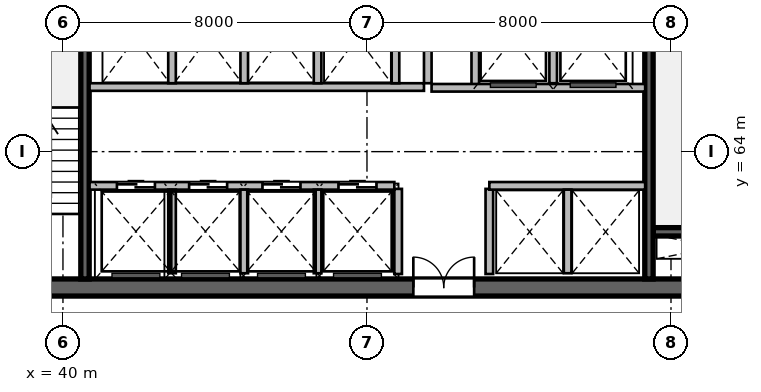
"""IFC4 building model, lengths in metres.
Left out: names, types, materials, properties, quantities, classifications, styles, units other than length and angle.
Written with IfcOpenShell. Run it as: python <this file> out.ifc"""

import sys

from ifc_helpers import new_model, si_unit, direction, frame, frame_2d, origin, place, context, subcontext, project, spatial, rectangle, extrude, source, transform, mapped, element, fill, save


model = new_model("IFC4")
c1 = context("Model", 3, precision=1e-05, world=origin(), true_north=direction((0.0, 1.0)))
c2 = subcontext(c1, "Body", "Model", "MODEL_VIEW")
j1 = project(units=[si_unit("LENGTHUNIT", "METRE"), si_unit("PLANEANGLEUNIT", "RADIAN")], contexts=[c1])
p1 = place(None, origin())
s1 = spatial("IfcSite", under=j1, at=p1, CompositionType="ELEMENT")
p2 = place(p1, origin())
s2 = spatial("IfcBuilding", under=s1, at=p2, CompositionType="ELEMENT")
p3 = place(p2, frame((0.0, 0.0, 204.0)))
s3 = spatial("IfcBuildingStorey", under=s2, at=p3, CompositionType="ELEMENT", Elevation=204.0)
m1 = source(origin(), c2, "Body", "SweptSolid", [
    extrude(rectangle(XDim=21.6, YDim=0.45, at=frame_2d((10.8, 0.0))), origin(), (0.0, 0.0, 1.0), 3.9),
])
p4 = place(p3, frame((37.2, 60.425, 0.0), z_axis=(0.0, 0.0, 1.0), x_axis=(1.0, 0.0, 0.0)))
e1 = element("IfcWall", 1, at=p4, inside=s3, PredefinedType="SHEAR", context=c2, shape_type="MappedRepresentation", body=[
    mapped(m1, transform((0.0, 0.0, 0.0), scale=1.0)),
])
p5 = place(p4, frame((1.1, 0.0, 0.0)))
e2 = element("IfcOpeningElement", 2, at=p5, cuts=e1, PredefinedType="OPENING", context=c2, shape_type="SweptSolid", body=[
    extrude(rectangle(XDim=1.15, YDim=2.15, at=frame_2d((0.575, 1.075))), frame((0.0, 0.235, 0.0), z_axis=(0.0, -1.0, 0.0), x_axis=(1.0, 0.0, 0.0)), (0.0, 0.0, 1.0), 0.47),
])
p6 = place(p4, frame((19.5, 0.0, 0.0)))
e3 = element("IfcOpeningElement", 3, at=p6, cuts=e1, PredefinedType="OPENING", context=c2, shape_type="SweptSolid", body=[
    extrude(rectangle(XDim=0.9, YDim=2.1, at=frame_2d((0.45, 1.05))), frame((0.0, 0.235, 0.0), z_axis=(0.0, -1.0, 0.0), x_axis=(1.0, 0.0, 0.0)), (0.0, 0.0, 1.0), 0.47),
])
p7 = place(p4, frame((12.02, 0.0, 0.0)))
e4 = element("IfcOpeningElement", 4, at=p7, cuts=e1, PredefinedType="OPENING", context=c2, shape_type="SweptSolid", body=[
    extrude(rectangle(XDim=1.6, YDim=2.15, at=frame_2d((0.8, 1.075))), frame((0.0, 0.235, 0.0), z_axis=(0.0, -1.0, 0.0), x_axis=(1.0, 0.0, 0.0)), (0.0, 0.0, 1.0), 0.47),
])
m2 = source(origin(), c2, "Body", "SweptSolid", [
    extrude(rectangle(XDim=3.27, YDim=0.22, at=frame_2d((1.635, 0.0))), origin(), (0.0, 0.0, 1.0), 3.9),
])
p8 = place(p3, frame((55.53, 61.89, 0.0), z_axis=(0.0, 0.0, 1.0), x_axis=(1.0, 0.0, 0.0)))
e5 = element("IfcWall", 5, at=p8, inside=s3, PredefinedType="SHEAR", context=c2, shape_type="MappedRepresentation", body=[
    mapped(m2, transform((0.0, 0.0, 0.0), scale=1.0)),
])
m3 = source(origin(), c2, "Body", "SweptSolid", [
    extrude(rectangle(XDim=11.1, YDim=0.22, at=frame_2d((5.55, 0.0))), origin(), (0.0, 0.0, 1.0), 3.9),
])
p9 = place(p3, frame((40.58, 60.65, 0.0), z_axis=(0.0, 0.0, 1.0), x_axis=(0.0, 1.0, 0.0)))
e6 = element("IfcWall", 6, at=p9, inside=s3, PredefinedType="SHEAR", context=c2, shape_type="MappedRepresentation", body=[
    mapped(m3, transform((0.0, 0.0, 0.0), scale=1.0)),
])
p10 = place(p3, frame((55.42, 60.65, 0.0), z_axis=(0.0, 0.0, 1.0), x_axis=(0.0, 1.0, 0.0)))
e7 = element("IfcWall", 7, at=p10, inside=s3, PredefinedType="SHEAR", context=c2, shape_type="MappedRepresentation", body=[
    mapped(m3, transform((0.0, 0.0, 0.0), scale=1.0)),
])
p11 = place(p10, frame((9.595, 0.0, 0.0)))
e8 = element("IfcOpeningElement", 8, at=p11, cuts=e7, PredefinedType="OPENING", context=c2, shape_type="SweptSolid", body=[
    extrude(rectangle(XDim=1.15, YDim=2.15, at=frame_2d((0.575, 1.075))), frame((0.0, 0.12, 0.0), z_axis=(0.0, -1.0, 0.0), x_axis=(1.0, 0.0, 0.0)), (0.0, 0.0, 1.0), 0.24),
])
m4 = source(origin(), c2, "Body", "SweptSolid", [
    extrude(rectangle(XDim=2.24, YDim=0.2, at=frame_2d((1.12, 0.0))), origin(), (0.0, 0.0, 1.0), 3.64),
])
for number, where, z_axis, x_axis in (
    (9, (48.82, 60.78, 0.0), (0.0, 0.0, 1.0), (0.0, 1.0, 0.0)),
    (10, (51.22, 60.78, 0.0), (0.0, 0.0, 1.0), (0.0, 1.0, 0.0)),
):
    element("IfcWall", number, at=place(p3, frame(where, z_axis=z_axis, x_axis=x_axis)), inside=s3, PredefinedType="SOLIDWALL", context=c2, shape_type="MappedRepresentation", body=[
        mapped(m4, transform((0.0, 0.0, 0.0), scale=1.0)),
    ])
m5 = source(origin(), c2, "Body", "SweptSolid", [
    extrude(rectangle(XDim=5.8, YDim=0.2, at=frame_2d((2.9, 0.0))), origin(), (0.0, 0.0, 1.0), 3.64),
])
p12 = place(p3, frame((49.6, 65.8, 0.0), z_axis=(0.0, 0.0, 1.0), x_axis=(0.0, 1.0, 0.0)))
e11 = element("IfcWall", 11, at=p12, inside=s3, PredefinedType="SOLIDWALL", context=c2, shape_type="MappedRepresentation", body=[
    mapped(m5, transform((0.0, 0.0, 0.0), scale=1.0)),
])
m6 = source(origin(), c2, "Body", "SweptSolid", [
    extrude(rectangle(XDim=2.58, YDim=0.2, at=frame_2d((1.29, 0.0))), origin(), (0.0, 0.0, 1.0), 3.64),
])
p13 = place(p3, frame((50.85, 65.68, 0.0), z_axis=(0.0, 0.0, 1.0), x_axis=(0.0, 1.0, 0.0)))
e12 = element("IfcWall", 12, at=p13, inside=s3, PredefinedType="SOLIDWALL", context=c2, shape_type="MappedRepresentation", body=[
    mapped(m6, transform((0.0, 0.0, 0.0), scale=1.0)),
])
m7 = source(origin(), c2, "Body", "SweptSolid", [
    extrude(rectangle(XDim=2.4, YDim=0.2, at=frame_2d((1.2, 0.0))), origin(), (0.0, 0.0, 1.0), 3.64),
])
p14 = place(p3, frame((52.9, 65.8, 0.0), z_axis=(0.0, 0.0, 1.0), x_axis=(0.0, 1.0, 0.0)))
e13 = element("IfcWall", 13, at=p14, inside=s3, PredefinedType="SOLIDWALL", context=c2, shape_type="MappedRepresentation", body=[
    mapped(m7, transform((0.0, 0.0, 0.0), scale=1.0)),
])
m8 = source(origin(), c2, "Body", "SweptSolid", [
    extrude(rectangle(XDim=5.62, YDim=0.2, at=frame_2d((2.81, 0.0))), origin(), (0.0, 0.0, 1.0), 3.64),
])
p15 = place(p3, frame((49.7, 65.68, 0.0), z_axis=(0.0, 0.0, 1.0), x_axis=(1.0, 0.0, 0.0)))
e14 = element("IfcWall", 14, at=p15, inside=s3, PredefinedType="SOLIDWALL", context=c2, shape_type="MappedRepresentation", body=[
    mapped(m8, transform((0.0, 0.0, 0.0), scale=1.0)),
])
m9 = source(origin(), c2, "Body", "SweptSolid", [
    extrude(rectangle(XDim=8.02, YDim=0.2, at=frame_2d((4.01, 0.0))), origin(), (0.0, 0.0, 1.0), 3.64),
])
p16 = place(p3, frame((40.7, 63.1, 0.0), z_axis=(0.0, 0.0, 1.0), x_axis=(1.0, 0.0, 0.0)))
e15 = element("IfcWall", 15, at=p16, inside=s3, PredefinedType="SOLIDWALL", context=c2, shape_type="MappedRepresentation", body=[
    mapped(m9, transform((0.0, 0.0, 0.0), scale=1.0)),
])
p17 = place(p16, frame((0.72, 0.0, 0.0)))
e16 = element("IfcOpeningElement", 16, at=p17, cuts=e15, PredefinedType="OPENING", context=c2, shape_type="SweptSolid", body=[
    extrude(rectangle(XDim=1.0, YDim=2.15, at=frame_2d((0.5, 1.075))), frame((0.0, 0.11, 0.0), z_axis=(0.0, -1.0, 0.0), x_axis=(1.0, 0.0, 0.0)), (0.0, 0.0, 1.0), 0.22),
])
p18 = place(p16, frame((2.62, 0.0, 0.0)))
e17 = element("IfcOpeningElement", 17, at=p18, cuts=e15, PredefinedType="OPENING", context=c2, shape_type="SweptSolid", body=[
    extrude(rectangle(XDim=1.0, YDim=2.15, at=frame_2d((0.5, 1.075))), frame((0.0, 0.11, 0.0), z_axis=(0.0, -1.0, 0.0), x_axis=(1.0, 0.0, 0.0)), (0.0, 0.0, 1.0), 0.22),
])
p19 = place(p16, frame((4.55, 0.0, 0.0)))
e18 = element("IfcOpeningElement", 18, at=p19, cuts=e15, PredefinedType="OPENING", context=c2, shape_type="SweptSolid", body=[
    extrude(rectangle(XDim=1.0, YDim=2.15, at=frame_2d((0.5, 1.075))), frame((0.0, 0.11, 0.0), z_axis=(0.0, -1.0, 0.0), x_axis=(1.0, 0.0, 0.0)), (0.0, 0.0, 1.0), 0.22),
])
p20 = place(p16, frame((6.55, 0.0, 0.0)))
e19 = element("IfcOpeningElement", 19, at=p20, cuts=e15, PredefinedType="OPENING", context=c2, shape_type="SweptSolid", body=[
    extrude(rectangle(XDim=1.0, YDim=2.15, at=frame_2d((0.5, 1.075))), frame((0.0, 0.11, 0.0), z_axis=(0.0, -1.0, 0.0), x_axis=(1.0, 0.0, 0.0)), (0.0, 0.0, 1.0), 0.22),
])
m10 = source(origin(), c2, "Body", "SweptSolid", [
    extrude(rectangle(XDim=4.1, YDim=0.2, at=frame_2d((2.05, 0.0))), origin(), (0.0, 0.0, 1.0), 3.64),
])
p21 = place(p3, frame((51.22, 63.1, 0.0), z_axis=(0.0, 0.0, 1.0), x_axis=(1.0, 0.0, 0.0)))
e20 = element("IfcWall", 20, at=p21, inside=s3, PredefinedType="SOLIDWALL", context=c2, shape_type="MappedRepresentation", body=[
    mapped(m10, transform((0.0, 0.0, 0.0), scale=1.0)),
])
m11 = source(origin(), c2, "Body", "SweptSolid", [
    extrude(rectangle(XDim=2.2, YDim=0.2, at=frame_2d((1.1, 0.0))), origin(), (0.0, 0.0, 1.0), 3.64),
])
for number, where, z_axis, x_axis in (
    (21, (42.87, 60.8, 0.0), (0.0, 0.0, 1.0), (0.0, 1.0, 0.0)),
    (22, (44.77, 60.8, 0.0), (0.0, 0.0, 1.0), (0.0, 1.0, 0.0)),
    (23, (46.7, 60.8, 0.0), (0.0, 0.0, 1.0), (0.0, 1.0, 0.0)),
    (24, (53.28, 60.8, 0.0), (0.0, 0.0, 1.0), (0.0, 1.0, 0.0)),
):
    element("IfcWall", number, at=place(p3, frame(where, z_axis=z_axis, x_axis=x_axis)), inside=s3, PredefinedType="SOLIDWALL", context=c2, shape_type="MappedRepresentation", body=[
        mapped(m11, transform((0.0, 0.0, 0.0), scale=1.0)),
    ])
m12 = source(origin(), c2, "Body", "SweptSolid", [
    extrude(rectangle(XDim=8.8, YDim=0.2, at=frame_2d((4.4, 0.0))), origin(), (0.0, 0.0, 1.0), 3.64),
])
p22 = place(p3, frame((40.7, 65.7, 0.0), z_axis=(0.0, 0.0, 1.0), x_axis=(1.0, 0.0, 0.0)))
e25 = element("IfcWall", 25, at=p22, inside=s3, PredefinedType="SOLIDWALL", context=c2, shape_type="MappedRepresentation", body=[
    mapped(m12, transform((0.0, 0.0, 0.0), scale=1.0)),
])
for number, where, z_axis, x_axis in (
    (26, (48.75, 65.8, 0.0), (0.0, 0.0, 1.0), (0.0, 1.0, 0.0)),
    (27, (42.87, 65.8, 0.0), (0.0, 0.0, 1.0), (0.0, 1.0, 0.0)),
    (28, (44.77, 65.8, 0.0), (0.0, 0.0, 1.0), (0.0, 1.0, 0.0)),
    (29, (46.7, 65.8, 0.0), (0.0, 0.0, 1.0), (0.0, 1.0, 0.0)),
):
    element("IfcWall", number, at=place(p3, frame(where, z_axis=z_axis, x_axis=x_axis)), inside=s3, PredefinedType="SOLIDWALL", context=c2, shape_type="MappedRepresentation", body=[
        mapped(m7, transform((0.0, 0.0, 0.0), scale=1.0)),
    ])
m13 = source(origin(), c2, "Body", "SweptSolid", [
    extrude(rectangle(XDim=1.6, YDim=2.15, at=frame_2d((0.8, 1.075))), frame((0.0, 0.025, 0.0), z_axis=(0.0, -1.0, 0.0), x_axis=(1.0, 0.0, 0.0)), (0.0, 0.0, 1.0), 0.05),
])
p23 = place(p7, origin())
e30 = element("IfcDoor", 30, at=p23, inside=s3, OperationType="DOUBLE_DOOR_SINGLE_SWING", PredefinedType="DOOR", context=c2, shape_type="MappedRepresentation", body=[
    mapped(m13, transform((0.0, 0.0, 0.0), scale=1.0)),
])
fill(e4, e30)
m14 = source(origin(), c2, "Body", "SweptSolid", [
    extrude(rectangle(XDim=1.0, YDim=2.15, at=frame_2d((0.5, 1.075))), frame((0.0, 0.025, 0.0), z_axis=(0.0, -1.0, 0.0), x_axis=(1.0, 0.0, 0.0)), (0.0, 0.0, 1.0), 0.05),
])
p24 = place(p17, origin())
e31 = element("IfcDoor", 31, at=p24, inside=s3, OperationType="DOUBLE_DOOR_SLIDING", PredefinedType="DOOR", context=c2, shape_type="MappedRepresentation", body=[
    mapped(m14, transform((0.0, 0.0, 0.0), scale=1.0)),
])
fill(e16, e31)
p25 = place(p18, origin())
e32 = element("IfcDoor", 32, at=p25, inside=s3, OperationType="DOUBLE_DOOR_SLIDING", PredefinedType="DOOR", context=c2, shape_type="MappedRepresentation", body=[
    mapped(m14, transform((0.0, 0.0, 0.0), scale=1.0)),
])
fill(e17, e32)
p26 = place(p19, origin())
e33 = element("IfcDoor", 33, at=p26, inside=s3, OperationType="DOUBLE_DOOR_SLIDING", PredefinedType="DOOR", context=c2, shape_type="MappedRepresentation", body=[
    mapped(m14, transform((0.0, 0.0, 0.0), scale=1.0)),
])
fill(e18, e33)
p27 = place(p20, origin())
e34 = element("IfcDoor", 34, at=p27, inside=s3, OperationType="DOUBLE_DOOR_SLIDING", PredefinedType="DOOR", context=c2, shape_type="MappedRepresentation", body=[
    mapped(m14, transform((0.0, 0.0, 0.0), scale=1.0)),
])
fill(e19, e34)
save(model, sys.argv[1])
